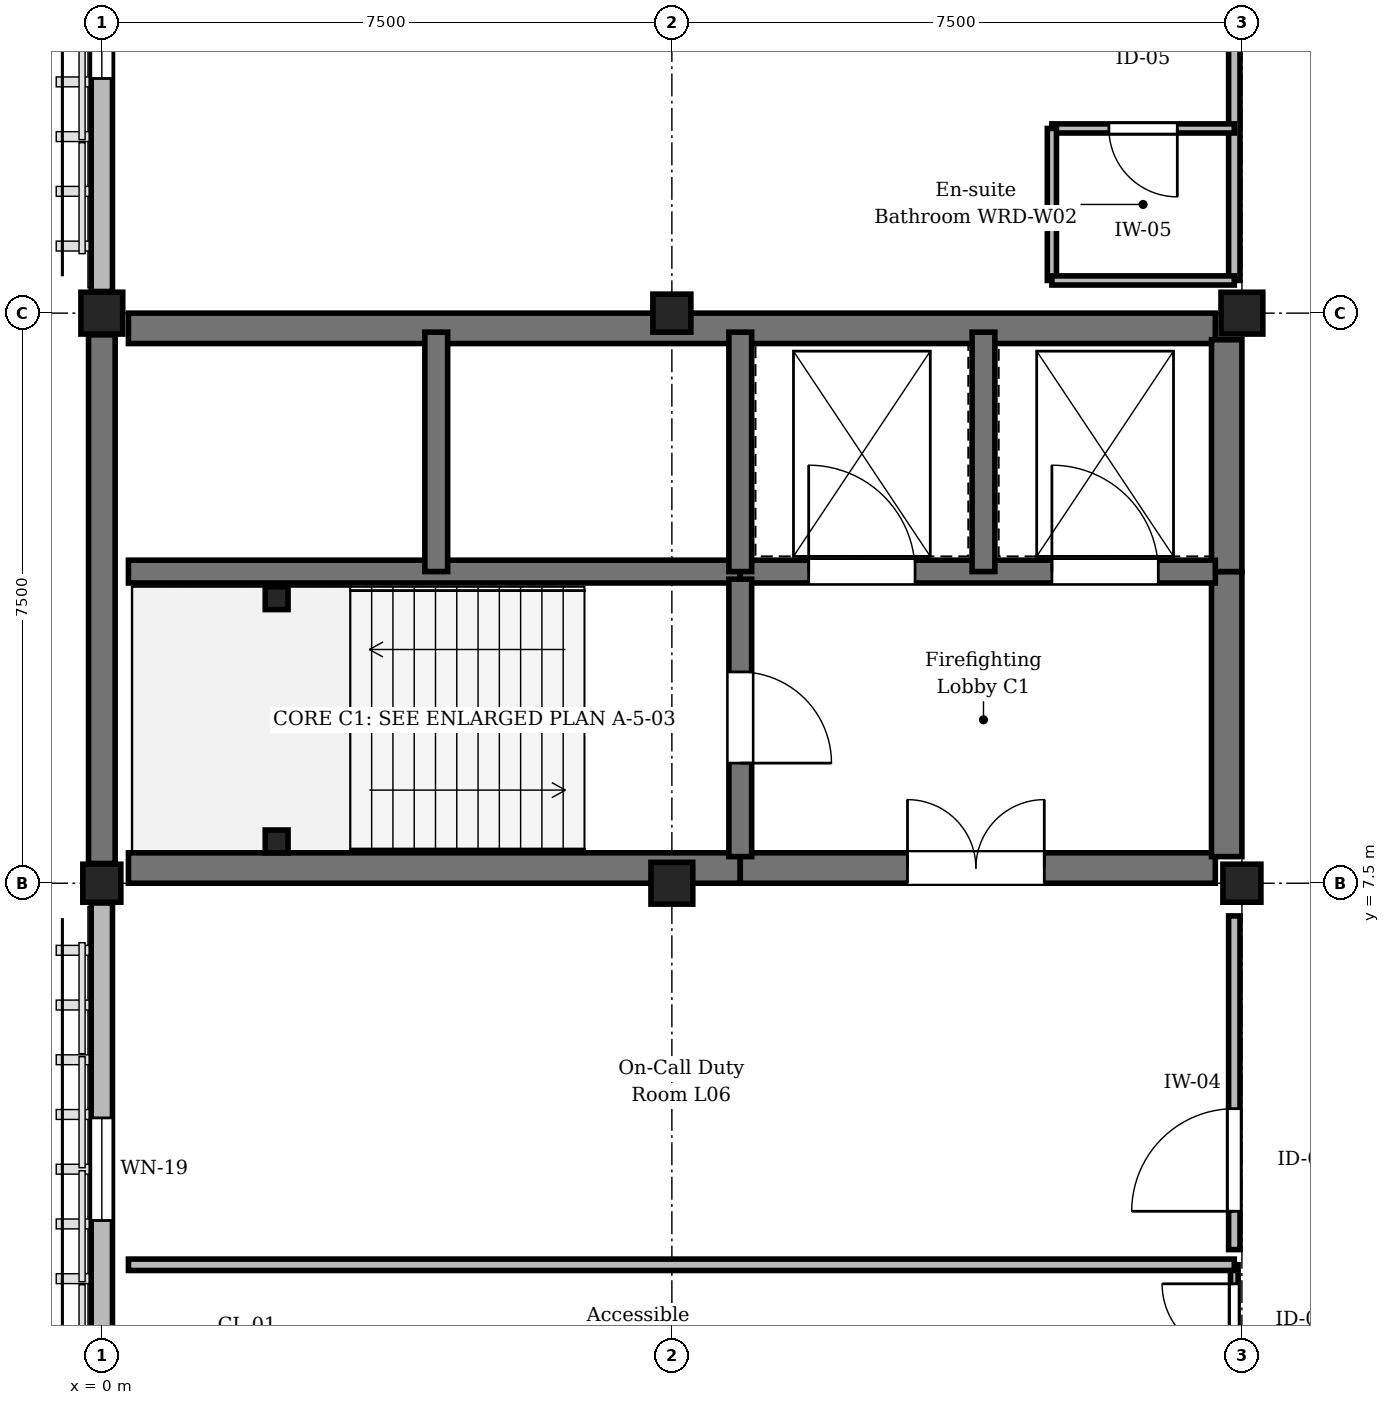
"""IFC4 building model, lengths in metres.
Left out: names, types, materials, properties, quantities, classifications, styles, units other than length and angle.
Written with IfcOpenShell. Run it as: python <this file> out.ifc"""

import sys

from ifc_helpers import new_model, si_unit, direction, frame, frame_2d, origin, origin_2d, place, context, subcontext, project, spatial, rectangle, i_section, extrude, element, fill, save


model = new_model("IFC4")
c1 = context("Model", 3, precision=1e-05, world=origin(), true_north=direction((0.0, 1.0)))
c2 = subcontext(c1, "Body", "Model", "MODEL_VIEW")
j1 = project(units=[si_unit("LENGTHUNIT", "METRE"), si_unit("PLANEANGLEUNIT", "RADIAN")], contexts=[c1])
p1 = place(None, origin())
s1 = spatial("IfcSite", under=j1, at=p1, CompositionType="ELEMENT")
p2 = place(p1, origin())
s2 = spatial("IfcBuilding", under=s1, at=p2, CompositionType="ELEMENT")
p3 = place(p2, frame((0.0, 0.0, 25.95)))
s3 = spatial("IfcBuildingStorey", under=s2, at=p3, CompositionType="ELEMENT", Elevation=25.95)
p4 = place(p3, frame((0.0, 7.5, 0.0), z_axis=(0.0, 0.0, 1.0), x_axis=(1.0, 0.0, 0.0)))
e1 = element("IfcColumn", 1, at=p4, inside=s3, PredefinedType="COLUMN", context=c2, shape_type="SweptSolid", body=[
    extrude(rectangle(XDim=0.5, YDim=0.5, at=origin_2d()), origin(), (0.0, 0.0, 1.0), 4.05),
])
for number, where, z_axis, x_axis in (
    (2, (0.0, 15.0, 0.0), (0.0, 0.0, 1.0), (1.0, 0.0, 0.0)),
    (3, (7.5, 7.5, 0.0), (0.0, 0.0, 1.0), (1.0, 0.0, 0.0)),
):
    element("IfcColumn", number, at=place(p3, frame(where, z_axis=z_axis, x_axis=x_axis)), inside=s3, PredefinedType="COLUMN", context=c2, shape_type="SweptSolid", body=[
        extrude(rectangle(XDim=0.55, YDim=0.55, at=origin_2d()), origin(), (0.0, 0.0, 1.0), 4.05),
    ])
for number, where, z_axis, x_axis in (
    (4, (7.5, 15.0, 0.0), (0.0, 0.0, 1.0), (1.0, 0.0, 0.0)),
    (5, (15.0, 7.5, 0.0), (0.0, 0.0, 1.0), (1.0, 0.0, 0.0)),
):
    element("IfcColumn", number, at=place(p3, frame(where, z_axis=z_axis, x_axis=x_axis)), inside=s3, PredefinedType="COLUMN", context=c2, shape_type="SweptSolid", body=[
        extrude(rectangle(XDim=0.5, YDim=0.5, at=origin_2d()), origin(), (0.0, 0.0, 1.0), 4.05),
    ])
p5 = place(p3, frame((15.0, 15.0, 0.0), z_axis=(0.0, 0.0, 1.0), x_axis=(1.0, 0.0, 0.0)))
e6 = element("IfcColumn", 6, at=p5, inside=s3, PredefinedType="COLUMN", context=c2, shape_type="SweptSolid", body=[
    extrude(rectangle(XDim=0.55, YDim=0.55, at=origin_2d()), origin(), (0.0, 0.0, 1.0), 4.05),
])
for number, where, z_axis, x_axis in (
    (7, (2.3, 8.05, 0.0), (0.0, 0.0, 1.0), (1.0, 0.0, 0.0)),
    (8, (2.3, 11.25, 0.0), (0.0, 0.0, 1.0), (1.0, 0.0, 0.0)),
):
    element("IfcColumn", number, at=place(p3, frame(where, z_axis=z_axis, x_axis=x_axis)), inside=s3, PredefinedType="COLUMN", context=c2, shape_type="SweptSolid", body=[
        extrude(i_section(OverallWidth=0.3, OverallDepth=0.3, WebThickness=0.011, FlangeThickness=0.019, FilletRadius=0.027, at=origin_2d()), origin(), (0.0, 0.0, 1.0), 4.05),
    ])
p6 = place(p3, frame((0.0, 0.235, 0.0), z_axis=(0.0, 0.0, 1.0), x_axis=(0.0, 1.0, 0.0)))
e9 = element("IfcWall", 9, at=p6, inside=s3, PredefinedType="STANDARD", context=c2, shape_type="SweptSolid", body=[
    extrude(rectangle(XDim=7.005, YDim=0.28, at=frame_2d((3.502, 0.0))), origin(), (0.0, 0.0, 1.0), 3.17),
])
p7 = place(p6, frame((2.827, 0.0, 0.85)))
e10 = element("IfcOpeningElement", 10, at=p7, cuts=e9, PredefinedType="OPENING", context=c2, shape_type="SweptSolid", body=[
    extrude(rectangle(XDim=1.35, YDim=2.04, at=frame_2d((0.675, 1.02))), frame((0.0, 0.15, 0.0), z_axis=(0.0, -1.0, 0.0), x_axis=(1.0, 0.0, 0.0)), (0.0, 0.0, 1.0), 0.3),
])
p8 = place(p3, frame((0.0, 7.76, 0.0), z_axis=(0.0, 0.0, 1.0), x_axis=(0.0, 1.0, 0.0)))
e11 = element("IfcWall", 11, at=p8, inside=s3, PredefinedType="SHEAR", context=c2, shape_type="SweptSolid", body=[
    extrude(rectangle(XDim=6.955, YDim=0.35, at=frame_2d((3.478, 0.0))), origin(), (0.0, 0.0, 1.0), 3.77),
])
p9 = place(p3, frame((0.0, 15.285, 0.0), z_axis=(0.0, 0.0, 1.0), x_axis=(0.0, 1.0, 0.0)))
e12 = element("IfcWall", 12, at=p9, inside=s3, PredefinedType="STANDARD", context=c2, shape_type="SweptSolid", body=[
    extrude(rectangle(XDim=6.955, YDim=0.28, at=frame_2d((3.478, 0.0))), origin(), (0.0, 0.0, 1.0), 3.17),
])
p10 = place(p9, frame((2.802, 0.0, 0.85)))
e13 = element("IfcOpeningElement", 13, at=p10, cuts=e12, PredefinedType="OPENING", context=c2, shape_type="SweptSolid", body=[
    extrude(rectangle(XDim=1.35, YDim=2.04, at=frame_2d((0.675, 1.02))), frame((0.0, 0.15, 0.0), z_axis=(0.0, -1.0, 0.0), x_axis=(1.0, 0.0, 0.0)), (0.0, 0.0, 1.0), 0.3),
])
p11 = place(p3, frame((0.35, 7.7, 0.0), z_axis=(0.0, 0.0, 1.0), x_axis=(1.0, 0.0, 0.0)))
e14 = element("IfcWall", 14, at=p11, inside=s3, PredefinedType="SHEAR", context=c2, shape_type="SweptSolid", body=[
    extrude(rectangle(XDim=8.05, YDim=0.4, at=frame_2d((4.025, 0.0))), origin(), (0.0, 0.0, 1.0), 3.77),
])
p12 = place(p3, frame((8.4, 7.7, 0.0), z_axis=(0.0, 0.0, 1.0), x_axis=(1.0, 0.0, 0.0)))
e15 = element("IfcWall", 15, at=p12, inside=s3, PredefinedType="SHEAR", context=c2, shape_type="SweptSolid", body=[
    extrude(rectangle(XDim=6.25, YDim=0.4, at=frame_2d((3.125, 0.0))), origin(), (0.0, 0.0, 1.0), 3.77),
])
p13 = place(p12, frame((2.2, 0.0, 0.0)))
e16 = element("IfcOpeningElement", 16, at=p13, cuts=e15, PredefinedType="OPENING", context=c2, shape_type="SweptSolid", body=[
    extrude(rectangle(XDim=1.8, YDim=2.25, at=frame_2d((0.9, 1.125))), frame((0.0, 0.21, 0.0), z_axis=(0.0, -1.0, 0.0), x_axis=(1.0, 0.0, 0.0)), (0.0, 0.0, 1.0), 0.42),
])
p14 = place(p3, frame((0.35, 14.8, 0.0), z_axis=(0.0, 0.0, 1.0), x_axis=(1.0, 0.0, 0.0)))
e17 = element("IfcWall", 17, at=p14, inside=s3, PredefinedType="SHEAR", context=c2, shape_type="SweptSolid", body=[
    extrude(rectangle(XDim=14.3, YDim=0.4, at=frame_2d((7.15, 0.0))), origin(), (0.0, 0.0, 1.0), 3.77),
])
p15 = place(p3, frame((14.8, 7.85, 0.0), z_axis=(0.0, 0.0, 1.0), x_axis=(0.0, 1.0, 0.0)))
e18 = element("IfcWall", 18, at=p15, inside=s3, PredefinedType="SHEAR", context=c2, shape_type="SweptSolid", body=[
    extrude(rectangle(XDim=3.75, YDim=0.4, at=frame_2d((1.875, 0.0))), origin(), (0.0, 0.0, 1.0), 3.77),
])
p16 = place(p3, frame((14.8, 11.6, 0.0), z_axis=(0.0, 0.0, 1.0), x_axis=(0.0, 1.0, 0.0)))
e19 = element("IfcWall", 19, at=p16, inside=s3, PredefinedType="SHEAR", context=c2, shape_type="SweptSolid", body=[
    extrude(rectangle(XDim=3.05, YDim=0.4, at=frame_2d((1.525, 0.0))), origin(), (0.0, 0.0, 1.0), 3.77),
])
p17 = place(p3, frame((0.35, 11.6, 0.0), z_axis=(0.0, 0.0, 1.0), x_axis=(1.0, 0.0, 0.0)))
e20 = element("IfcWall", 20, at=p17, inside=s3, PredefinedType="SHEAR", context=c2, shape_type="SweptSolid", body=[
    extrude(rectangle(XDim=8.05, YDim=0.3, at=frame_2d((4.025, 0.0))), origin(), (0.0, 0.0, 1.0), 3.77),
])
p18 = place(p3, frame((8.4, 11.6, 0.0), z_axis=(0.0, 0.0, 1.0), x_axis=(1.0, 0.0, 0.0)))
e21 = element("IfcWall", 21, at=p18, inside=s3, PredefinedType="SHEAR", context=c2, shape_type="SweptSolid", body=[
    extrude(rectangle(XDim=6.25, YDim=0.3, at=frame_2d((3.125, 0.0))), origin(), (0.0, 0.0, 1.0), 3.77),
])
p19 = place(p18, frame((0.9, 0.0, 0.0)))
e22 = element("IfcOpeningElement", 22, at=p19, cuts=e21, PredefinedType="OPENING", context=c2, shape_type="SweptSolid", body=[
    extrude(rectangle(XDim=1.4, YDim=2.25, at=frame_2d((0.7, 1.125))), frame((0.0, 0.16, 0.0), z_axis=(0.0, -1.0, 0.0), x_axis=(1.0, 0.0, 0.0)), (0.0, 0.0, 1.0), 0.32),
])
p20 = place(p18, frame((4.1, 0.0, 0.0)))
e23 = element("IfcOpeningElement", 23, at=p20, cuts=e21, PredefinedType="OPENING", context=c2, shape_type="SweptSolid", body=[
    extrude(rectangle(XDim=1.4, YDim=2.25, at=frame_2d((0.7, 1.125))), frame((0.0, 0.16, 0.0), z_axis=(0.0, -1.0, 0.0), x_axis=(1.0, 0.0, 0.0)), (0.0, 0.0, 1.0), 0.32),
])
p21 = place(p3, frame((8.4, 11.5, 0.0), z_axis=(0.0, 0.0, 1.0), x_axis=(0.0, -1.0, 0.0)))
e24 = element("IfcWall", 24, at=p21, inside=s3, PredefinedType="SHEAR", context=c2, shape_type="SweptSolid", body=[
    extrude(rectangle(XDim=3.65, YDim=0.3, at=frame_2d((1.825, 0.0))), origin(), (0.0, 0.0, 1.0), 3.77),
])
p22 = place(p21, frame((1.22, 0.0, 0.0)))
e25 = element("IfcOpeningElement", 25, at=p22, cuts=e24, PredefinedType="OPENING", context=c2, shape_type="SweptSolid", body=[
    extrude(rectangle(XDim=1.2, YDim=2.25, at=frame_2d((0.6, 1.125))), frame((0.0, 0.16, 0.0), z_axis=(0.0, -1.0, 0.0), x_axis=(1.0, 0.0, 0.0)), (0.0, 0.0, 1.0), 0.32),
])
for number, where, z_axis, x_axis in (
    (26, (4.4, 11.6, 0.0), (0.0, 0.0, 1.0), (0.0, 1.0, 0.0)),
    (27, (8.4, 11.6, 0.0), (0.0, 0.0, 1.0), (0.0, 1.0, 0.0)),
    (28, (11.6, 11.6, 0.0), (0.0, 0.0, 1.0), (0.0, 1.0, 0.0)),
):
    element("IfcWall", number, at=place(p3, frame(where, z_axis=z_axis, x_axis=x_axis)), inside=s3, PredefinedType="SHEAR", context=c2, shape_type="SweptSolid", body=[
        extrude(rectangle(XDim=3.15, YDim=0.3, at=frame_2d((1.575, 0.0))), origin(), (0.0, 0.0, 1.0), 3.77),
    ])
p23 = place(p3, frame((14.9, 0.43, 0.0), z_axis=(0.0, 0.0, 1.0), x_axis=(0.0, 1.0, 0.0)))
e29 = element("IfcWall", 29, at=p23, inside=s3, PredefinedType="PARTITIONING", context=c2, shape_type="SweptSolid", body=[
    extrude(rectangle(XDim=2.05, YDim=0.1, at=frame_2d((1.025, 0.0))), origin(), (0.0, 0.0, 1.0), 3.205),
])
p24 = place(p23, frame((0.85, 0.0, 0.0)))
e30 = element("IfcOpeningElement", 30, at=p24, cuts=e29, PredefinedType="OPENING", context=c2, shape_type="SweptSolid", body=[
    extrude(rectangle(XDim=0.95, YDim=2.15, at=frame_2d((0.475, 1.075))), frame((0.0, 0.06, 0.0), z_axis=(0.0, -1.0, 0.0), x_axis=(1.0, 0.0, 0.0)), (0.0, 0.0, 1.0), 0.12),
])
p25 = place(p3, frame((14.9, 2.68, 0.0), z_axis=(0.0, 0.0, 1.0), x_axis=(0.0, 1.0, 0.0)))
e31 = element("IfcWall", 31, at=p25, inside=s3, PredefinedType="PARTITIONING", context=c2, shape_type="SweptSolid", body=[
    extrude(rectangle(XDim=4.39, YDim=0.15, at=frame_2d((2.195, 0.0))), origin(), (0.0, 0.0, 1.0), 3.205),
])
p26 = place(p25, frame((0.504, 0.0, 0.0)))
e32 = element("IfcOpeningElement", 32, at=p26, cuts=e31, PredefinedType="OPENING", context=c2, shape_type="SweptSolid", body=[
    extrude(rectangle(XDim=1.35, YDim=2.25, at=frame_2d((0.675, 1.125))), frame((0.0, 0.085, 0.0), z_axis=(0.0, -1.0, 0.0), x_axis=(1.0, 0.0, 0.0)), (0.0, 0.0, 1.0), 0.17),
])
p27 = place(p3, frame((14.9, 15.43, 0.0), z_axis=(0.0, 0.0, 1.0), x_axis=(0.0, 1.0, 0.0)))
e33 = element("IfcWall", 33, at=p27, inside=s3, PredefinedType="PARTITIONING", context=c2, shape_type="SweptSolid", body=[
    extrude(rectangle(XDim=12.607, YDim=0.15, at=frame_2d((6.303, 0.0))), origin(), (0.0, 0.0, 1.0), 3.055),
])
p28 = place(p27, frame((11.057, 0.0, 0.0)))
e34 = element("IfcOpeningElement", 34, at=p28, cuts=e33, PredefinedType="OPENING", context=c2, shape_type="SweptSolid", body=[
    extrude(rectangle(XDim=1.3, YDim=2.2, at=frame_2d((0.65, 1.1))), frame((0.0, 0.085, 0.0), z_axis=(0.0, -1.0, 0.0), x_axis=(1.0, 0.0, 0.0)), (0.0, 0.0, 1.0), 0.17),
])
p29 = place(p3, frame((14.9, 17.43, 0.0), z_axis=(0.0, 0.0, 1.0), x_axis=(-1.0, 0.0, 0.0)))
e35 = element("IfcWall", 35, at=p29, inside=s3, PredefinedType="PARTITIONING", context=c2, shape_type="SweptSolid", body=[
    extrude(rectangle(XDim=2.4, YDim=0.12, at=frame_2d((1.2, 0.0))), origin(), (0.0, 0.0, 1.0), 3.755),
])
p30 = place(p29, frame((0.75, 0.0, 0.0)))
e36 = element("IfcOpeningElement", 36, at=p30, cuts=e35, PredefinedType="OPENING", context=c2, shape_type="SweptSolid", body=[
    extrude(rectangle(XDim=0.9, YDim=2.1, at=frame_2d((0.45, 1.05))), frame((0.0, 0.07, 0.0), z_axis=(0.0, -1.0, 0.0), x_axis=(1.0, 0.0, 0.0)), (0.0, 0.0, 1.0), 0.14),
])
p31 = place(p3, frame((12.5, 15.43, 0.0), z_axis=(0.0, 0.0, 1.0), x_axis=(0.0, 1.0, 0.0)))
e37 = element("IfcWall", 37, at=p31, inside=s3, PredefinedType="PARTITIONING", context=c2, shape_type="SweptSolid", body=[
    extrude(rectangle(XDim=2.0, YDim=0.12, at=frame_2d((1.0, 0.0))), origin(), (0.0, 0.0, 1.0), 3.755),
])
p32 = place(p3, frame((0.35, 2.48, 0.0), z_axis=(0.0, 0.0, 1.0), x_axis=(1.0, 0.0, 0.0)))
e38 = element("IfcWall", 38, at=p32, inside=s3, PredefinedType="PARTITIONING", context=c2, shape_type="SweptSolid", body=[
    extrude(rectangle(XDim=14.55, YDim=0.15, at=frame_2d((7.275, 0.0))), origin(), (0.0, 0.0, 1.0), 3.755),
])
p33 = place(p3, frame((12.5, 15.43, 0.0), z_axis=(0.0, 0.0, 1.0), x_axis=(1.0, 0.0, 0.0)))
e39 = element("IfcWall", 39, at=p33, inside=s3, PredefinedType="PARTITIONING", context=c2, shape_type="SweptSolid", body=[
    extrude(rectangle(XDim=2.4, YDim=0.12, at=frame_2d((1.2, 0.0))), origin(), (0.0, 0.0, 1.0), 3.755),
])
p34 = place(p7, origin())
e40 = element("IfcWindow", 40, at=p34, inside=s3, PartitioningType="SINGLE_PANEL", PredefinedType="WINDOW", context=c2, shape_type="SweptSolid", body=[
    extrude(rectangle(XDim=1.35, YDim=2.04, at=frame_2d((0.675, 1.02))), frame((0.0, 0.03, 0.0), z_axis=(0.0, -1.0, 0.0), x_axis=(1.0, 0.0, 0.0)), (0.0, 0.0, 1.0), 0.06),
])
fill(e10, e40)
p35 = place(p10, origin())
e41 = element("IfcWindow", 41, at=p35, inside=s3, PartitioningType="SINGLE_PANEL", PredefinedType="WINDOW", context=c2, shape_type="SweptSolid", body=[
    extrude(rectangle(XDim=1.35, YDim=2.04, at=frame_2d((0.675, 1.02))), frame((0.0, 0.03, 0.0), z_axis=(0.0, -1.0, 0.0), x_axis=(1.0, 0.0, 0.0)), (0.0, 0.0, 1.0), 0.06),
])
fill(e13, e41)
p36 = place(p13, origin())
e42 = element("IfcDoor", 42, at=p36, inside=s3, OperationType="DOUBLE_DOOR_SINGLE_SWING", PredefinedType="DOOR", context=c2, shape_type="SweptSolid", body=[
    extrude(rectangle(XDim=1.8, YDim=2.25, at=frame_2d((0.9, 1.125))), frame((0.0, 0.025, 0.0), z_axis=(0.0, -1.0, 0.0), x_axis=(1.0, 0.0, 0.0)), (0.0, 0.0, 1.0), 0.05),
])
fill(e16, e42)
p37 = place(p19, origin())
e43 = element("IfcDoor", 43, at=p37, inside=s3, OperationType="DOUBLE_DOOR_SLIDING", PredefinedType="DOOR", context=c2, shape_type="SweptSolid", body=[
    extrude(rectangle(XDim=1.4, YDim=2.25, at=frame_2d((0.7, 1.125))), frame((0.0, 0.025, 0.0), z_axis=(0.0, -1.0, 0.0), x_axis=(1.0, 0.0, 0.0)), (0.0, 0.0, 1.0), 0.05),
])
fill(e22, e43)
p38 = place(p20, origin())
e44 = element("IfcDoor", 44, at=p38, inside=s3, OperationType="DOUBLE_DOOR_SLIDING", PredefinedType="DOOR", context=c2, shape_type="SweptSolid", body=[
    extrude(rectangle(XDim=1.4, YDim=2.25, at=frame_2d((0.7, 1.125))), frame((0.0, 0.025, 0.0), z_axis=(0.0, -1.0, 0.0), x_axis=(1.0, 0.0, 0.0)), (0.0, 0.0, 1.0), 0.05),
])
fill(e23, e44)
p39 = place(p22, origin())
e45 = element("IfcDoor", 45, at=p39, inside=s3, OperationType="SINGLE_SWING_RIGHT", PredefinedType="DOOR", context=c2, shape_type="SweptSolid", body=[
    extrude(rectangle(XDim=1.2, YDim=2.25, at=frame_2d((0.6, 1.125))), frame((0.0, 0.025, 0.0), z_axis=(0.0, -1.0, 0.0), x_axis=(1.0, 0.0, 0.0)), (0.0, 0.0, 1.0), 0.05),
])
fill(e25, e45)
p40 = place(p24, origin())
e46 = element("IfcDoor", 46, at=p40, inside=s3, OperationType="SINGLE_SWING_RIGHT", PredefinedType="DOOR", context=c2, shape_type="SweptSolid", body=[
    extrude(rectangle(XDim=0.95, YDim=2.15, at=frame_2d((0.475, 1.075))), frame((0.0, 0.025, 0.0), z_axis=(0.0, -1.0, 0.0), x_axis=(1.0, 0.0, 0.0)), (0.0, 0.0, 1.0), 0.05),
])
fill(e30, e46)
p41 = place(p26, origin())
e47 = element("IfcDoor", 47, at=p41, inside=s3, OperationType="SINGLE_SWING_LEFT", PredefinedType="DOOR", context=c2, shape_type="SweptSolid", body=[
    extrude(rectangle(XDim=1.35, YDim=2.25, at=frame_2d((0.675, 1.125))), frame((0.0, 0.025, 0.0), z_axis=(0.0, -1.0, 0.0), x_axis=(1.0, 0.0, 0.0)), (0.0, 0.0, 1.0), 0.05),
])
fill(e32, e47)
p42 = place(p30, origin())
e48 = element("IfcDoor", 48, at=p42, inside=s3, OperationType="SINGLE_SWING_LEFT", PredefinedType="DOOR", context=c2, shape_type="SweptSolid", body=[
    extrude(rectangle(XDim=0.9, YDim=2.1, at=frame_2d((0.45, 1.05))), frame((0.0, 0.025, 0.0), z_axis=(0.0, -1.0, 0.0), x_axis=(1.0, 0.0, 0.0)), (0.0, 0.0, 1.0), 0.05),
])
fill(e36, e48)
save(model, sys.argv[1])
